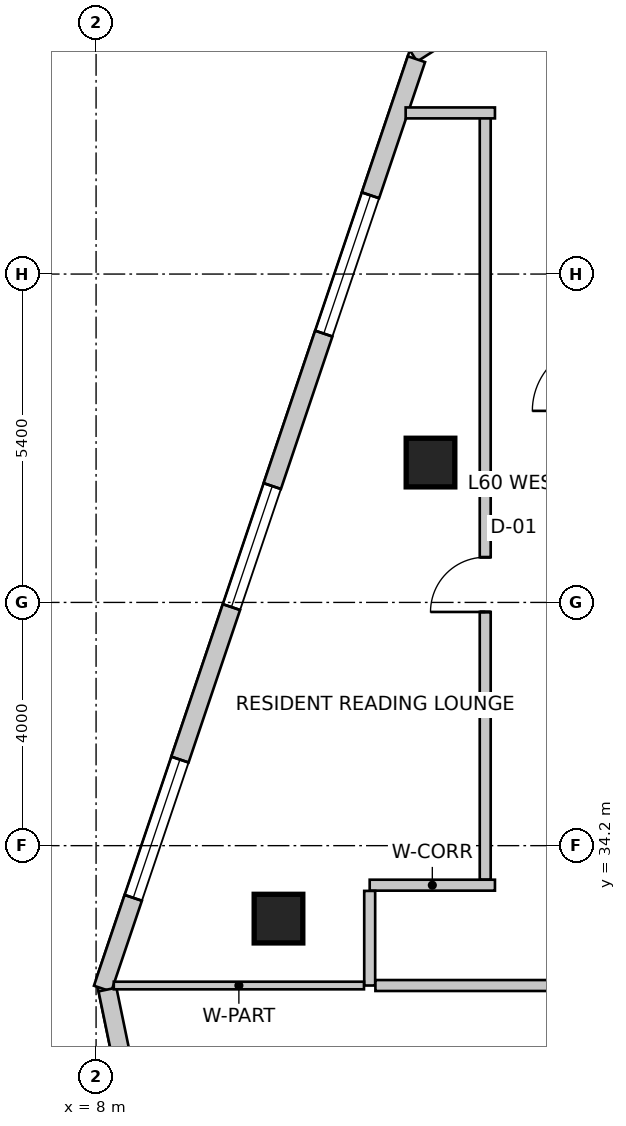
"""IFC4 building model, lengths in metres.
Left out: names, types, materials, properties, quantities, classifications, styles, units other than length and angle.
Written with IfcOpenShell. Run it as: python <this file> out.ifc"""

import sys

from ifc_helpers import new_model, si_unit, direction, frame, frame_2d, origin, origin_2d, place, context, subcontext, project, spatial, rectangle, extrude, source, transform, mapped, element, fill, save


model = new_model("IFC4")
c1 = context("Model", 3, precision=1e-05, world=origin(), true_north=direction((0.0, 1.0)))
c2 = subcontext(c1, "Body", "Model", "MODEL_VIEW")
j1 = project(units=[si_unit("LENGTHUNIT", "METRE"), si_unit("PLANEANGLEUNIT", "RADIAN")], contexts=[c1])
p1 = place(None, origin())
s1 = spatial("IfcSite", under=j1, at=p1, CompositionType="ELEMENT")
p2 = place(p1, origin())
s2 = spatial("IfcBuilding", under=s1, at=p2, CompositionType="ELEMENT")
p3 = place(p2, frame((0.0, 0.0, 235.9)))
s3 = spatial("IfcBuildingStorey", under=s2, at=p3, CompositionType="ELEMENT", Elevation=235.9)
m1 = source(origin(), c2, "Body", "SweptSolid", [
    extrude(rectangle(XDim=0.8, YDim=0.8, at=origin_2d()), origin(), (0.0, 0.0, 1.0), 3.5),
])
for number, where, z_axis, x_axis in (
    (1, (11.0, 33.0, 0.0), (0.0, 0.0, 1.0), (1.0, 0.0, 0.0)),
    (2, (13.5, 40.5, 0.0), (0.0, 0.0, 1.0), (1.0, 0.0, 0.0)),
):
    element("IfcColumn", number, at=place(p3, frame(where, z_axis=z_axis, x_axis=x_axis)), inside=s3, PredefinedType="COLUMN", context=c2, shape_type="MappedRepresentation", body=[
        mapped(m1, transform((0.0, 0.0, 0.0), scale=1.0)),
    ])
p4 = place(p3, frame((21.874, 52.742, 0.0), z_axis=(0.0, 0.0, 1.0), x_axis=(-0.84365659959, -0.536883173482, 0.0)))
e3 = element("IfcWall", 3, at=p4, inside=s3, PredefinedType="SOLIDWALL", context=c2, shape_type="SweptSolid", body=[
    extrude(rectangle(XDim=10.283, YDim=0.3, at=frame_2d((5.142, 0.0))), origin(), (0.0, 0.0, 1.0), 3.25),
])
m2 = source(origin(), c2, "Body", "SweptSolid", [
    extrude(rectangle(XDim=2.1, YDim=2.0, at=frame_2d((1.05, 1.0))), frame((0.0, 0.16, 0.0), z_axis=(0.0, -1.0, 0.0), x_axis=(1.0, 0.0, 0.0)), (0.0, 0.0, 1.0), 0.32),
])
p5 = place(p4, frame((3.457, 0.0, 0.85)))
e4 = element("IfcOpeningElement", 4, at=p5, cuts=e3, PredefinedType="OPENING", context=c2, shape_type="MappedRepresentation", body=[
    mapped(m2, transform((0.0, 0.0, 0.0), scale=1.0)),
])
p6 = place(p3, frame((13.269, 47.134, 0.0), z_axis=(0.0, 0.0, 1.0), x_axis=(-0.319920776449, -0.947444297464, 0.0)))
e5 = element("IfcWall", 5, at=p6, inside=s3, PredefinedType="SOLIDWALL", context=c2, shape_type="SweptSolid", body=[
    extrude(rectangle(XDim=16.133, YDim=0.3, at=frame_2d((8.067, 0.0))), origin(), (0.0, 0.0, 1.0), 3.25),
])
m3 = source(origin(), c2, "Body", "SweptSolid", [
    extrude(rectangle(XDim=2.4, YDim=2.2, at=frame_2d((1.2, 1.1))), frame((0.0, 0.16, 0.0), z_axis=(0.0, -1.0, 0.0), x_axis=(1.0, 0.0, 0.0)), (0.0, 0.0, 1.0), 0.32),
])
p7 = place(p6, frame((2.363, 0.0, 0.85)))
e6 = element("IfcOpeningElement", 6, at=p7, cuts=e5, PredefinedType="OPENING", context=c2, shape_type="MappedRepresentation", body=[
    mapped(m3, transform((0.0, 0.0, 0.0), scale=1.0)),
])
p8 = place(p6, frame((7.41, 0.0, 0.85)))
e7 = element("IfcOpeningElement", 7, at=p8, cuts=e5, PredefinedType="OPENING", context=c2, shape_type="MappedRepresentation", body=[
    mapped(m2, transform((0.0, 0.0, 0.0), scale=1.0)),
])
p9 = place(p6, frame((12.157, 0.0, 0.85)))
e8 = element("IfcOpeningElement", 8, at=p9, cuts=e5, PredefinedType="OPENING", context=c2, shape_type="MappedRepresentation", body=[
    mapped(m3, transform((0.0, 0.0, 0.0), scale=1.0)),
])
p10 = place(p3, frame((8.188, 31.834, 0.0), z_axis=(0.0, 0.0, 1.0), x_axis=(0.202303475707, -0.979322880217, 0.0)))
e9 = element("IfcWall", 9, at=p10, inside=s3, PredefinedType="SOLIDWALL", context=c2, shape_type="SweptSolid", body=[
    extrude(rectangle(XDim=15.766, YDim=0.3, at=frame_2d((7.883, 0.0))), origin(), (0.0, 0.0, 1.0), 3.25),
])
p11 = place(p10, frame((2.29, 0.0, 0.85)))
e10 = element("IfcOpeningElement", 10, at=p11, cuts=e9, PredefinedType="OPENING", context=c2, shape_type="MappedRepresentation", body=[
    mapped(m2, transform((0.0, 0.0, 0.0), scale=1.0)),
])
p12 = place(p10, frame((8.179, 0.0, 0.85)))
e11 = element("IfcOpeningElement", 11, at=p12, cuts=e9, PredefinedType="OPENING", context=c2, shape_type="MappedRepresentation", body=[
    mapped(m3, transform((0.0, 0.0, 0.0), scale=1.0)),
])
p13 = place(p10, frame((13.092, 0.0, 0.85)))
e12 = element("IfcOpeningElement", 12, at=p13, cuts=e9, PredefinedType="OPENING", context=c2, shape_type="MappedRepresentation", body=[
    mapped(m2, transform((0.0, 0.0, 0.0), scale=1.0)),
])
p14 = place(p3, frame((12.5, 33.55, 0.0), z_axis=(0.0, 0.0, 1.0), x_axis=(1.0, 0.0, 0.0)))
e13 = element("IfcWall", 13, at=p14, inside=s3, PredefinedType="PARTITIONING", context=c2, shape_type="SweptSolid", body=[
    extrude(rectangle(XDim=2.06, YDim=0.18, at=frame_2d((1.03, 0.0))), origin(), (0.0, 0.0, 1.0), 3.25),
])
p15 = place(p3, frame((12.5, 31.9, 0.0), z_axis=(0.0, 0.0, 1.0), x_axis=(0.0, 1.0, 0.0)))
e14 = element("IfcWall", 14, at=p15, inside=s3, PredefinedType="PARTITIONING", context=c2, shape_type="SweptSolid", body=[
    extrude(rectangle(XDim=1.556, YDim=0.18, at=frame_2d((0.778, 0.0))), origin(), (0.0, 0.0, 1.0), 2.835),
])
p16 = place(p3, frame((17.96, 31.9, 0.0), z_axis=(0.0, 0.0, 1.0), x_axis=(-1.0, 0.0, 0.0)))
e15 = element("IfcWall", 15, at=p16, inside=s3, PredefinedType="PARTITIONING", context=c2, shape_type="SweptSolid", body=[
    extrude(rectangle(XDim=5.366, YDim=0.18, at=frame_2d((2.683, 0.0))), origin(), (0.0, 0.0, 1.0), 2.835),
])
p17 = place(p3, frame((14.4, 33.644, 0.0), z_axis=(0.0, 0.0, 1.0), x_axis=(0.0, 1.0, 0.0)))
e16 = element("IfcWall", 16, at=p17, inside=s3, PredefinedType="PARTITIONING", context=c2, shape_type="SweptSolid", body=[
    extrude(rectangle(XDim=12.606, YDim=0.18, at=frame_2d((6.303, 0.0))), origin(), (0.0, 0.0, 1.0), 3.25),
])
m4 = source(origin(), c2, "Body", "SweptSolid", [
    extrude(rectangle(XDim=0.9, YDim=2.15, at=frame_2d((0.45, 1.075))), frame((0.0, 0.1, 0.0), z_axis=(0.0, -1.0, 0.0), x_axis=(1.0, 0.0, 0.0)), (0.0, 0.0, 1.0), 0.2),
])
p18 = place(p17, frame((4.399, 0.0, 0.0)))
e17 = element("IfcOpeningElement", 17, at=p18, cuts=e16, PredefinedType="OPENING", context=c2, shape_type="MappedRepresentation", body=[
    mapped(m4, transform((0.0, 0.0, 0.0), scale=1.0)),
])
p19 = place(p3, frame((14.56, 46.25, 0.0), z_axis=(0.0, 0.0, 1.0), x_axis=(-1.0, 0.0, 0.0)))
e18 = element("IfcWall", 18, at=p19, inside=s3, PredefinedType="PARTITIONING", context=c2, shape_type="SweptSolid", body=[
    extrude(rectangle(XDim=1.469, YDim=0.18, at=frame_2d((0.734, 0.0))), origin(), (0.0, 0.0, 1.0), 3.25),
])
p20 = place(p3, frame((12.406, 31.9, 0.0), z_axis=(0.0, 0.0, 1.0), x_axis=(-1.0, 0.0, 0.0)))
e19 = element("IfcWall", 19, at=p20, inside=s3, PredefinedType="PARTITIONING", context=c2, shape_type="SweptSolid", body=[
    extrude(rectangle(XDim=4.115, YDim=0.125, at=frame_2d((2.057, 0.0))), origin(), (0.0, 0.0, 1.0), 2.542),
])
m5 = source(origin(), c2, "Body", "SweptSolid", [
    extrude(rectangle(XDim=2.4, YDim=2.2, at=frame_2d((1.2, 1.1))), frame((0.0, -0.015, 0.0), z_axis=(0.0, -1.0, 0.0), x_axis=(1.0, 0.0, 0.0)), (0.0, 0.0, 1.0), 0.06),
])
p21 = place(p7, origin())
e20 = element("IfcWindow", 20, at=p21, inside=s3, PartitioningType="SINGLE_PANEL", PredefinedType="WINDOW", context=c2, shape_type="MappedRepresentation", body=[
    mapped(m5, transform((0.0, 0.0, 0.0), scale=1.0)),
])
fill(e6, e20)
m6 = source(origin(), c2, "Body", "SweptSolid", [
    extrude(rectangle(XDim=2.1, YDim=2.0, at=frame_2d((1.05, 1.0))), frame((0.0, -0.015, 0.0), z_axis=(0.0, -1.0, 0.0), x_axis=(1.0, 0.0, 0.0)), (0.0, 0.0, 1.0), 0.06),
])
p22 = place(p8, origin())
e21 = element("IfcWindow", 21, at=p22, inside=s3, PartitioningType="SINGLE_PANEL", PredefinedType="WINDOW", context=c2, shape_type="MappedRepresentation", body=[
    mapped(m6, transform((0.0, 0.0, 0.0), scale=1.0)),
])
fill(e7, e21)
p23 = place(p9, origin())
e22 = element("IfcWindow", 22, at=p23, inside=s3, PartitioningType="SINGLE_PANEL", PredefinedType="WINDOW", context=c2, shape_type="MappedRepresentation", body=[
    mapped(m5, transform((0.0, 0.0, 0.0), scale=1.0)),
])
fill(e8, e22)
m7 = source(origin(), c2, "Body", "SweptSolid", [
    extrude(rectangle(XDim=0.9, YDim=2.15, at=frame_2d((0.45, 1.075))), frame((0.0, 0.025, 0.0), z_axis=(0.0, -1.0, 0.0), x_axis=(1.0, 0.0, 0.0)), (0.0, 0.0, 1.0), 0.05),
])
p24 = place(p18, origin())
e23 = element("IfcDoor", 23, at=p24, inside=s3, OperationType="SINGLE_SWING_LEFT", PredefinedType="DOOR", context=c2, shape_type="MappedRepresentation", body=[
    mapped(m7, transform((0.0, 0.0, 0.0), scale=1.0)),
])
fill(e17, e23)
save(model, sys.argv[1])
